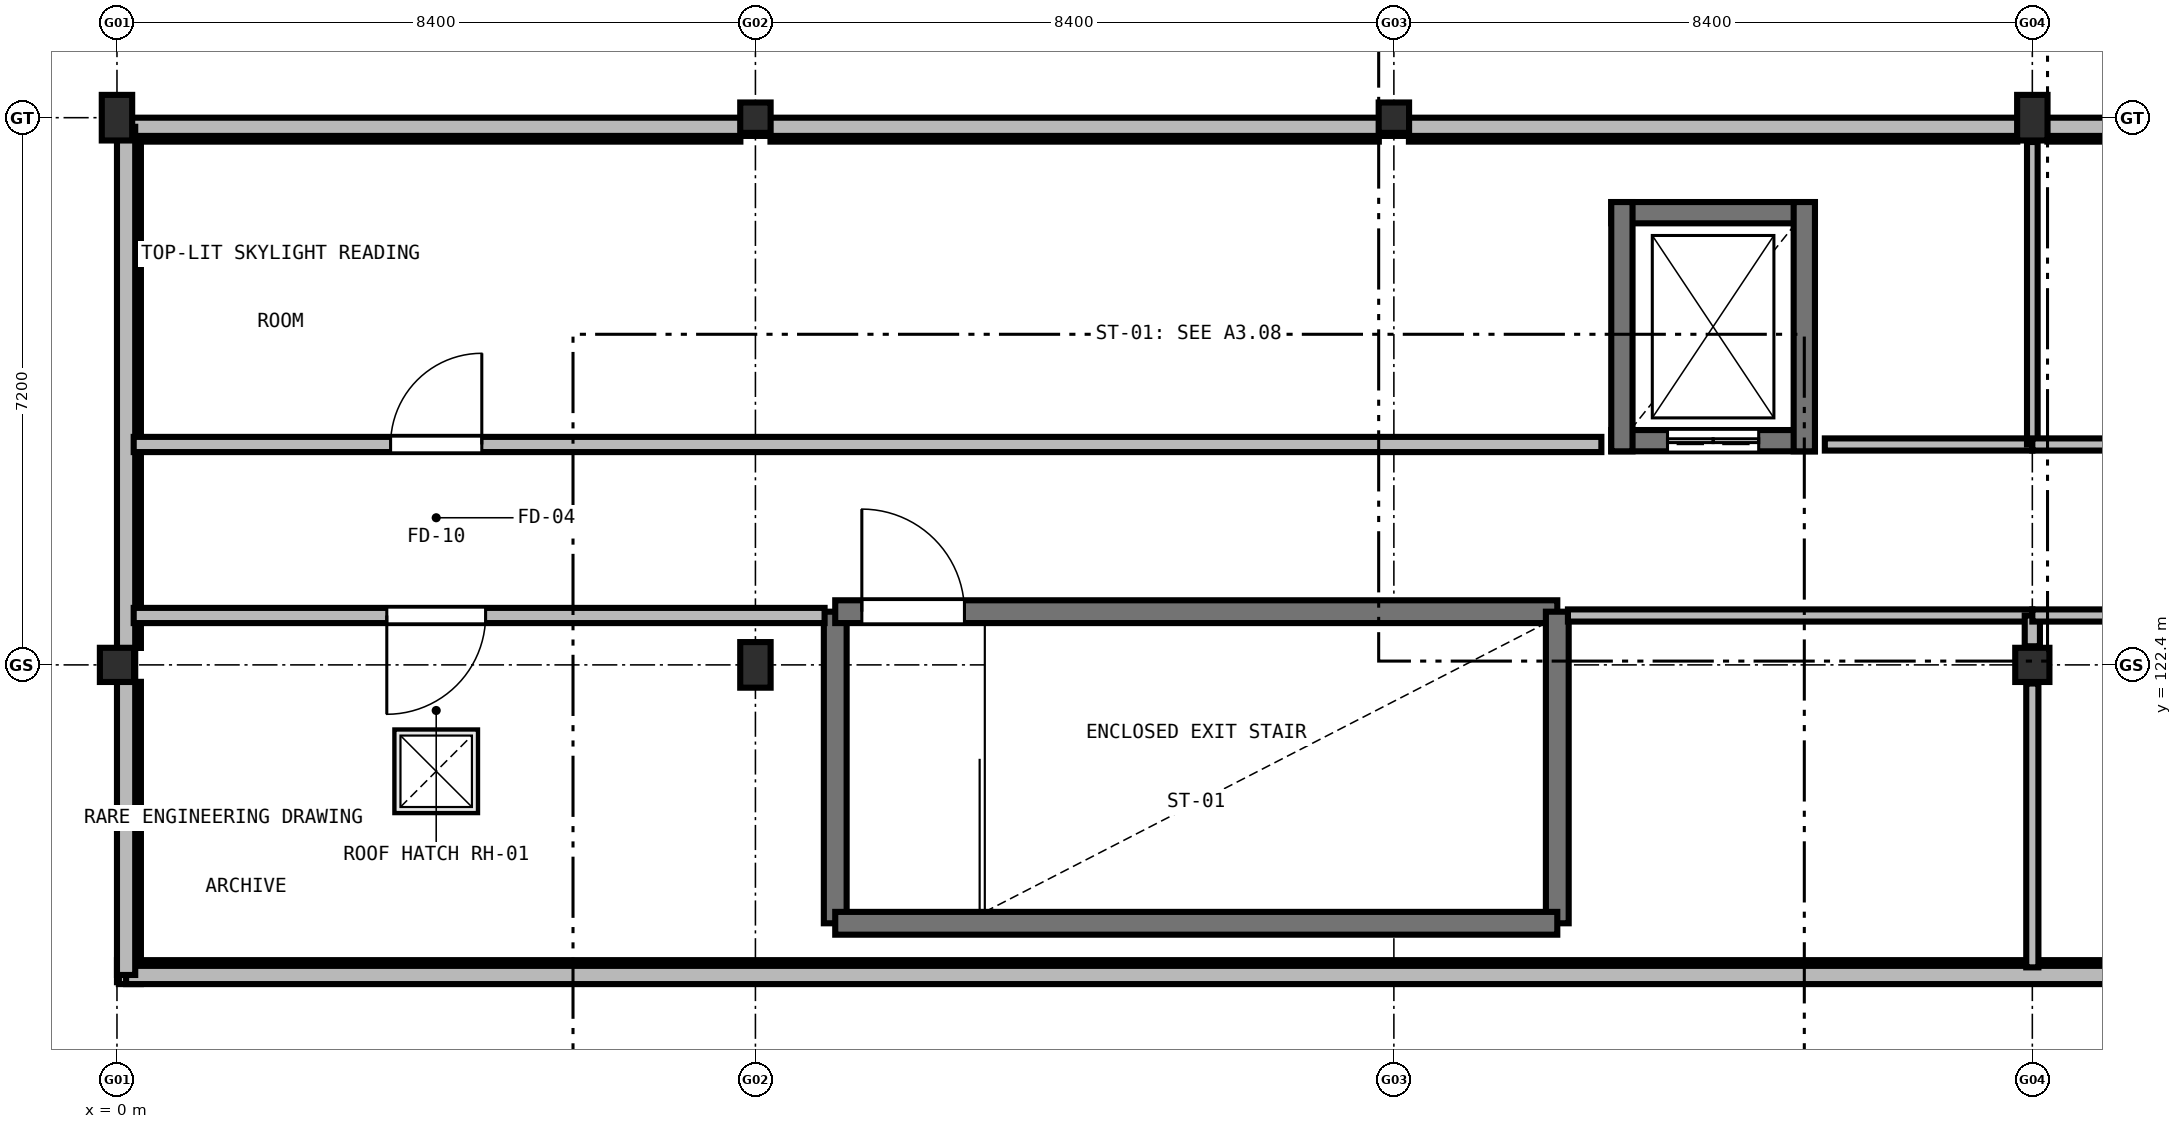
"""IFC4 building model, lengths in metres.
Left out: names, types, materials, properties, quantities, classifications, styles, units other than length and angle.
Written with IfcOpenShell. Run it as: python <this file> out.ifc"""

import sys

from ifc_helpers import new_model, si_unit, direction, frame, frame_2d, origin, origin_2d, place, context, subcontext, project, spatial, rectangle, extrude, element, fill, save


model = new_model("IFC4")
c1 = context("Model", 3, precision=1e-05, world=origin(), true_north=direction((0.0, 1.0)))
c2 = subcontext(c1, "Body", "Model", "MODEL_VIEW")
j1 = project(units=[si_unit("LENGTHUNIT", "METRE"), si_unit("PLANEANGLEUNIT", "RADIAN")], contexts=[c1])
p1 = place(None, origin())
s1 = spatial("IfcSite", under=j1, at=p1, CompositionType="ELEMENT")
p2 = place(p1, origin())
s2 = spatial("IfcBuilding", under=s1, at=p2, CompositionType="ELEMENT")
p3 = place(p2, frame((0.0, 0.0, 26.1)))
s3 = spatial("IfcBuildingStorey", under=s2, at=p3, CompositionType="ELEMENT", Elevation=26.1)
p4 = place(p3, frame((0.0, 122.4, 0.0), z_axis=(0.0, 0.0, 1.0), x_axis=(1.0, 0.0, 0.0)))
e1 = element("IfcColumn", 1, at=p4, inside=s3, PredefinedType="COLUMN", context=c2, shape_type="SweptSolid", body=[
    extrude(rectangle(XDim=0.45, YDim=0.45, at=origin_2d()), origin(), (0.0, 0.0, 1.0), 4.2),
])
for number, where, z_axis, x_axis in (
    (2, (0.0, 129.6, 0.0), (0.0, 0.0, 1.0), (1.0, 0.0, 0.0)),
    (3, (8.4, 122.4, 0.0), (0.0, 0.0, 1.0), (1.0, 0.0, 0.0)),
):
    element("IfcColumn", number, at=place(p3, frame(where, z_axis=z_axis, x_axis=x_axis)), inside=s3, PredefinedType="COLUMN", context=c2, shape_type="SweptSolid", body=[
        extrude(rectangle(XDim=0.4, YDim=0.6, at=origin_2d()), origin(), (0.0, 0.0, 1.0), 4.2),
    ])
for number, where, z_axis, x_axis in (
    (4, (8.4, 129.6, 0.0), (0.0, 0.0, 1.0), (1.0, 0.0, 0.0)),
    (5, (16.8, 129.6, 0.0), (0.0, 0.0, 1.0), (1.0, 0.0, 0.0)),
):
    element("IfcColumn", number, at=place(p3, frame(where, z_axis=z_axis, x_axis=x_axis)), inside=s3, PredefinedType="COLUMN", context=c2, shape_type="SweptSolid", body=[
        extrude(rectangle(XDim=0.4, YDim=0.4, at=origin_2d()), origin(), (0.0, 0.0, 1.0), 4.2),
    ])
p5 = place(p3, frame((25.2, 122.4, 0.0), z_axis=(0.0, 0.0, 1.0), x_axis=(1.0, 0.0, 0.0)))
e6 = element("IfcColumn", 6, at=p5, inside=s3, PredefinedType="COLUMN", context=c2, shape_type="SweptSolid", body=[
    extrude(rectangle(XDim=0.45, YDim=0.45, at=origin_2d()), origin(), (0.0, 0.0, 1.0), 4.2),
])
p6 = place(p3, frame((25.2, 129.6, 0.0), z_axis=(0.0, 0.0, 1.0), x_axis=(1.0, 0.0, 0.0)))
e7 = element("IfcColumn", 7, at=p6, inside=s3, PredefinedType="COLUMN", context=c2, shape_type="SweptSolid", body=[
    extrude(rectangle(XDim=0.4, YDim=0.6, at=origin_2d()), origin(), (0.0, 0.0, 1.0), 4.2),
])
p7 = place(p3, frame((75.6, 118.37, 0.0), z_axis=(0.0, 0.0, 1.0), x_axis=(-1.0, 0.0, 0.0)))
e8 = element("IfcWall", 8, at=p7, inside=s3, PredefinedType="SOLIDWALL", context=c2, shape_type="SweptSolid", body=[
    extrude(rectangle(XDim=75.6, YDim=0.29, at=frame_2d((37.8, 0.0))), origin(), (0.0, 0.0, 1.0), 3.86),
])
p8 = place(p3, frame((0.17, 118.2, 0.0), z_axis=(0.0, 0.0, 1.0), x_axis=(0.0, 1.0, 0.0)))
e9 = element("IfcWall", 9, at=p8, inside=s3, PredefinedType="SOLIDWALL", context=c2, shape_type="SweptSolid", body=[
    extrude(rectangle(XDim=3.977, YDim=0.29, at=frame_2d((1.989, 0.0))), origin(), (0.0, 0.0, 1.0), 3.86),
])
p9 = place(p3, frame((0.17, 122.623, 0.0), z_axis=(0.0, 0.0, 1.0), x_axis=(0.0, 1.0, 0.0)))
e10 = element("IfcWall", 10, at=p9, inside=s3, PredefinedType="SOLIDWALL", context=c2, shape_type="SweptSolid", body=[
    extrude(rectangle(XDim=6.679, YDim=0.29, at=frame_2d((3.339, 0.0))), origin(), (0.0, 0.0, 1.0), 3.5),
])
p10 = place(p3, frame((0.198, 129.43, 0.0), z_axis=(0.0, 0.0, 1.0), x_axis=(1.0, 0.0, 0.0)))
e11 = element("IfcWall", 11, at=p10, inside=s3, PredefinedType="SOLIDWALL", context=c2, shape_type="SweptSolid", body=[
    extrude(rectangle(XDim=8.004, YDim=0.29, at=frame_2d((4.002, 0.0))), origin(), (0.0, 0.0, 1.0), 3.57),
])
p11 = place(p3, frame((8.598, 129.43, 0.0), z_axis=(0.0, 0.0, 1.0), x_axis=(1.0, 0.0, 0.0)))
e12 = element("IfcWall", 12, at=p11, inside=s3, PredefinedType="SOLIDWALL", context=c2, shape_type="SweptSolid", body=[
    extrude(rectangle(XDim=8.004, YDim=0.29, at=frame_2d((4.002, 0.0))), origin(), (0.0, 0.0, 1.0), 3.59),
])
p12 = place(p3, frame((16.998, 129.43, 0.0), z_axis=(0.0, 0.0, 1.0), x_axis=(1.0, 0.0, 0.0)))
e13 = element("IfcWall", 13, at=p12, inside=s3, PredefinedType="SOLIDWALL", context=c2, shape_type="SweptSolid", body=[
    extrude(rectangle(XDim=8.004, YDim=0.29, at=frame_2d((4.002, 0.0))), origin(), (0.0, 0.0, 1.0), 3.59),
])
p13 = place(p3, frame((25.398, 129.43, 0.0), z_axis=(0.0, 0.0, 1.0), x_axis=(1.0, 0.0, 0.0)))
e14 = element("IfcWall", 14, at=p13, inside=s3, PredefinedType="SOLIDWALL", context=c2, shape_type="SweptSolid", body=[
    extrude(rectangle(XDim=7.979, YDim=0.29, at=frame_2d((3.99, 0.0))), origin(), (0.0, 0.0, 1.0), 3.57),
])
for number, where, z_axis, x_axis in (
    (15, (0.12, 129.48, 4.2), (0.0, 0.0, 1.0), (1.0, 0.0, 0.0)),
    (16, (75.48, 118.32, 4.2), (0.0, 0.0, 1.0), (-1.0, 0.0, 0.0)),
):
    element("IfcWall", number, at=place(p3, frame(where, z_axis=z_axis, x_axis=x_axis)), inside=s3, PredefinedType="PARAPET", context=c2, shape_type="SweptSolid", body=[
        extrude(rectangle(XDim=75.36, YDim=0.24, at=frame_2d((37.68, 0.0))), origin(), (0.0, 0.0, 1.0), 0.95),
    ])
p14 = place(p3, frame((0.12, 118.32, 4.2), z_axis=(0.0, 0.0, 1.0), x_axis=(0.0, 1.0, 0.0)))
e17 = element("IfcWall", 17, at=p14, inside=s3, PredefinedType="PARAPET", context=c2, shape_type="SweptSolid", body=[
    extrude(rectangle(XDim=11.16, YDim=0.24, at=frame_2d((5.58, 0.0))), origin(), (0.0, 0.0, 1.0), 0.95),
])
p15 = place(p3, frame((9.45, 119.0, 0.0), z_axis=(0.0, 0.0, 1.0), x_axis=(0.0, 1.0, 0.0)))
e18 = element("IfcWall", 18, at=p15, inside=s3, PredefinedType="SHEAR", context=c2, shape_type="SweptSolid", body=[
    extrude(rectangle(XDim=4.1, YDim=0.3, at=frame_2d((2.05, 0.0))), origin(), (0.0, 0.0, 1.0), 3.96),
])
p16 = place(p3, frame((9.45, 123.1, 0.0), z_axis=(0.0, 0.0, 1.0), x_axis=(1.0, 0.0, 0.0)))
e19 = element("IfcWall", 19, at=p16, inside=s3, PredefinedType="SHEAR", context=c2, shape_type="SweptSolid", body=[
    extrude(rectangle(XDim=9.5, YDim=0.3, at=frame_2d((4.75, 0.0))), origin(), (0.0, 0.0, 1.0), 3.96),
])
p17 = place(p16, frame((0.35, 0.0, 0.0)))
e20 = element("IfcOpeningElement", 20, at=p17, cuts=e19, PredefinedType="OPENING", context=c2, shape_type="SweptSolid", body=[
    extrude(rectangle(XDim=1.35, YDim=2.2, at=frame_2d((0.675, 1.1))), frame((0.0, 0.16, 0.0), z_axis=(0.0, -1.0, 0.0), x_axis=(1.0, 0.0, 0.0)), (0.0, 0.0, 1.0), 0.32),
])
p18 = place(p3, frame((18.95, 123.1, 0.0), z_axis=(0.0, 0.0, 1.0), x_axis=(0.0, -1.0, 0.0)))
e21 = element("IfcWall", 21, at=p18, inside=s3, PredefinedType="SHEAR", context=c2, shape_type="SweptSolid", body=[
    extrude(rectangle(XDim=4.1, YDim=0.3, at=frame_2d((2.05, 0.0))), origin(), (0.0, 0.0, 1.0), 3.96),
])
p19 = place(p3, frame((18.95, 119.0, 0.0), z_axis=(0.0, 0.0, 1.0), x_axis=(-1.0, 0.0, 0.0)))
e22 = element("IfcWall", 22, at=p19, inside=s3, PredefinedType="SHEAR", context=c2, shape_type="SweptSolid", body=[
    extrude(rectangle(XDim=9.5, YDim=0.3, at=frame_2d((4.75, 0.0))), origin(), (0.0, 0.0, 1.0), 3.96),
])
p20 = place(p3, frame((22.34, 125.35, 0.0), z_axis=(0.0, 0.0, 1.0), x_axis=(-1.0, 0.0, 0.0)))
e23 = element("IfcWall", 23, at=p20, inside=s3, PredefinedType="SHEAR", context=c2, shape_type="SweptSolid", body=[
    extrude(rectangle(XDim=2.68, YDim=0.28, at=frame_2d((1.34, 0.0))), origin(), (0.0, 0.0, 1.0), 3.96),
])
p21 = place(p20, frame((0.74, 0.0, 0.0)))
e24 = element("IfcOpeningElement", 24, at=p21, cuts=e23, PredefinedType="OPENING", context=c2, shape_type="SweptSolid", body=[
    extrude(rectangle(XDim=1.2, YDim=2.15, at=frame_2d((0.6, 1.075))), frame((0.0, 0.15, 0.0), z_axis=(0.0, -1.0, 0.0), x_axis=(1.0, 0.0, 0.0)), (0.0, 0.0, 1.0), 0.3),
])
p22 = place(p3, frame((19.66, 128.35, 0.0), z_axis=(0.0, 0.0, 1.0), x_axis=(1.0, 0.0, 0.0)))
e25 = element("IfcWall", 25, at=p22, inside=s3, PredefinedType="SHEAR", context=c2, shape_type="SweptSolid", body=[
    extrude(rectangle(XDim=2.68, YDim=0.28, at=frame_2d((1.34, 0.0))), origin(), (0.0, 0.0, 1.0), 3.96),
])
for number, where, z_axis, x_axis in (
    (26, (19.8, 125.21, 0.0), (0.0, 0.0, 1.0), (0.0, 1.0, 0.0)),
    (27, (22.2, 128.49, 0.0), (0.0, 0.0, 1.0), (0.0, -1.0, 0.0)),
):
    element("IfcWall", number, at=place(p3, frame(where, z_axis=z_axis, x_axis=x_axis)), inside=s3, PredefinedType="SHEAR", context=c2, shape_type="SweptSolid", body=[
        extrude(rectangle(XDim=3.28, YDim=0.28, at=frame_2d((1.64, 0.0))), origin(), (0.0, 0.0, 1.0), 3.96),
    ])
p23 = place(p3, frame((0.22, 125.3, 0.0), z_axis=(0.0, 0.0, 1.0), x_axis=(1.0, 0.0, 0.0)))
e28 = element("IfcWall", 28, at=p23, inside=s3, PredefinedType="SOLIDWALL", context=c2, shape_type="SweptSolid", body=[
    extrude(rectangle(XDim=19.31, YDim=0.2, at=frame_2d((9.655, 0.0))), origin(), (0.0, 0.0, 1.0), 3.495),
])
p24 = place(p23, frame((3.38, 0.0, 0.0)))
e29 = element("IfcOpeningElement", 29, at=p24, cuts=e28, PredefinedType="OPENING", context=c2, shape_type="SweptSolid", body=[
    extrude(rectangle(XDim=1.2, YDim=2.15, at=frame_2d((0.6, 1.075))), frame((0.0, 0.11, 0.0), z_axis=(0.0, -1.0, 0.0), x_axis=(1.0, 0.0, 0.0)), (0.0, 0.0, 1.0), 0.22),
])
p25 = place(p3, frame((22.47, 125.3, 0.0), z_axis=(0.0, 0.0, 1.0), x_axis=(1.0, 0.0, 0.0)))
e30 = element("IfcWall", 30, at=p25, inside=s3, PredefinedType="PARTITIONING", context=c2, shape_type="SweptSolid", body=[
    extrude(rectangle(XDim=2.73, YDim=0.16, at=frame_2d((1.365, 0.0))), origin(), (0.0, 0.0, 1.0), 3.495),
])
p26 = place(p3, frame((25.2, 125.3, 0.0), z_axis=(0.0, 0.0, 1.0), x_axis=(0.0, 1.0, 0.0)))
e31 = element("IfcWall", 31, at=p26, inside=s3, PredefinedType="PARTITIONING", context=c2, shape_type="SweptSolid", body=[
    extrude(rectangle(XDim=3.98, YDim=0.14, at=frame_2d((1.99, 0.0))), origin(), (0.0, 0.0, 1.0), 3.495),
])
p27 = place(p3, frame((25.2, 125.3, 0.0), z_axis=(0.0, 0.0, 1.0), x_axis=(1.0, 0.0, 0.0)))
e32 = element("IfcWall", 32, at=p27, inside=s3, PredefinedType="PARTITIONING", context=c2, shape_type="SweptSolid", body=[
    extrude(rectangle(XDim=25.2, YDim=0.16, at=frame_2d((12.6, 0.0))), origin(), (0.0, 0.0, 1.0), 3.495),
])
p28 = place(p27, frame((3.625, 0.0, 0.0)))
e33 = element("IfcOpeningElement", 33, at=p28, cuts=e32, PredefinedType="OPENING", context=c2, shape_type="SweptSolid", body=[
    extrude(rectangle(XDim=1.15, YDim=2.15, at=frame_2d((0.575, 1.075))), frame((0.0, 0.09, 0.0), z_axis=(0.0, -1.0, 0.0), x_axis=(1.0, 0.0, 0.0)), (0.0, 0.0, 1.0), 0.18),
])
p29 = place(p3, frame((25.2, 123.05, 0.0), z_axis=(0.0, 0.0, 1.0), x_axis=(-1.0, 0.0, 0.0)))
e34 = element("IfcWall", 34, at=p29, inside=s3, PredefinedType="PARTITIONING", context=c2, shape_type="SweptSolid", body=[
    extrude(rectangle(XDim=6.11, YDim=0.16, at=frame_2d((3.055, 0.0))), origin(), (0.0, 0.0, 1.0), 3.495),
])
p30 = place(p3, frame((9.31, 123.05, 0.0), z_axis=(0.0, 0.0, 1.0), x_axis=(-1.0, 0.0, 0.0)))
e35 = element("IfcWall", 35, at=p30, inside=s3, PredefinedType="SOLIDWALL", context=c2, shape_type="SweptSolid", body=[
    extrude(rectangle(XDim=9.09, YDim=0.2, at=frame_2d((4.545, 0.0))), origin(), (0.0, 0.0, 1.0), 3.495),
])
p31 = place(p30, frame((4.46, 0.0, 0.0)))
e36 = element("IfcOpeningElement", 36, at=p31, cuts=e35, PredefinedType="OPENING", context=c2, shape_type="SweptSolid", body=[
    extrude(rectangle(XDim=1.3, YDim=2.15, at=frame_2d((0.65, 1.075))), frame((0.0, 0.11, 0.0), z_axis=(0.0, -1.0, 0.0), x_axis=(1.0, 0.0, 0.0)), (0.0, 0.0, 1.0), 0.22),
])
p32 = place(p3, frame((25.2, 118.42, 0.0), z_axis=(0.0, 0.0, 1.0), x_axis=(0.0, 1.0, 0.0)))
e37 = element("IfcWall", 37, at=p32, inside=s3, PredefinedType="PARTITIONING", context=c2, shape_type="SweptSolid", body=[
    extrude(rectangle(XDim=3.735, YDim=0.16, at=frame_2d((1.868, 0.0))), origin(), (0.0, 0.0, 1.0), 3.345),
])
p33 = place(p3, frame((25.2, 122.645, 0.0), z_axis=(0.0, 0.0, 1.0), x_axis=(0.0, 1.0, 0.0)))
e38 = element("IfcWall", 38, at=p33, inside=s3, PredefinedType="SOLIDWALL", context=c2, shape_type="SweptSolid", body=[
    extrude(rectangle(XDim=0.405, YDim=0.2, at=frame_2d((0.203, 0.0))), origin(), (0.0, 0.0, 1.0), 3.345),
])
p34 = place(p3, frame((33.6, 123.05, 0.0), z_axis=(0.0, 0.0, 1.0), x_axis=(-1.0, 0.0, 0.0)))
e39 = element("IfcWall", 39, at=p34, inside=s3, PredefinedType="PARTITIONING", context=c2, shape_type="SweptSolid", body=[
    extrude(rectangle(XDim=8.4, YDim=0.16, at=frame_2d((4.2, 0.0))), origin(), (0.0, 0.0, 1.0), 3.495),
])
p35 = place(p34, frame((3.675, 0.0, 0.0)))
e40 = element("IfcOpeningElement", 40, at=p35, cuts=e39, PredefinedType="OPENING", context=c2, shape_type="SweptSolid", body=[
    extrude(rectangle(XDim=1.05, YDim=2.15, at=frame_2d((0.525, 1.075))), frame((0.0, 0.09, 0.0), z_axis=(0.0, -1.0, 0.0), x_axis=(1.0, 0.0, 0.0)), (0.0, 0.0, 1.0), 0.18),
])
p36 = place(p2, frame((0.0, 0.0, 30.3)))
p37 = place(p36, frame((0.0, 0.0, -0.24)))
p38 = place(p37, frame((4.2, 121.0, 0.0)))
p39 = place(p38, frame((0.0, 0.0, 0.19)))
e41 = element("IfcDoor", 41, at=p39, inside=s3, OperationType="SINGLE_SWING_LEFT", PredefinedType="TRAPDOOR", context=c2, shape_type="SweptSolid", body=[
    extrude(rectangle(XDim=1.1, YDim=1.1, at=origin_2d()), origin(), (0.0, 0.0, 1.0), 0.05),
])
p40 = place(p17, origin())
e42 = element("IfcDoor", 42, at=p40, inside=s3, OperationType="SINGLE_SWING_LEFT", PredefinedType="DOOR", context=c2, shape_type="SweptSolid", body=[
    extrude(rectangle(XDim=1.35, YDim=2.2, at=frame_2d((0.675, 1.1))), frame((0.0, 0.025, 0.0), z_axis=(0.0, -1.0, 0.0), x_axis=(1.0, 0.0, 0.0)), (0.0, 0.0, 1.0), 0.05),
])
fill(e20, e42)
p41 = place(p21, origin())
e43 = element("IfcDoor", 43, at=p41, inside=s3, OperationType="DOUBLE_DOOR_SLIDING", PredefinedType="DOOR", context=c2, shape_type="SweptSolid", body=[
    extrude(rectangle(XDim=1.2, YDim=2.15, at=frame_2d((0.6, 1.075))), frame((0.0, 0.025, 0.0), z_axis=(0.0, -1.0, 0.0), x_axis=(1.0, 0.0, 0.0)), (0.0, 0.0, 1.0), 0.05),
])
fill(e24, e43)
p42 = place(p24, origin())
e44 = element("IfcDoor", 44, at=p42, inside=s3, OperationType="SINGLE_SWING_RIGHT", PredefinedType="DOOR", context=c2, shape_type="SweptSolid", body=[
    extrude(rectangle(XDim=1.2, YDim=2.15, at=frame_2d((0.6, 1.075))), frame((0.0, 0.025, 0.0), z_axis=(0.0, -1.0, 0.0), x_axis=(1.0, 0.0, 0.0)), (0.0, 0.0, 1.0), 0.05),
])
fill(e29, e44)
p43 = place(p31, origin())
e45 = element("IfcDoor", 45, at=p43, inside=s3, OperationType="SINGLE_SWING_RIGHT", PredefinedType="DOOR", context=c2, shape_type="SweptSolid", body=[
    extrude(rectangle(XDim=1.3, YDim=2.15, at=frame_2d((0.65, 1.075))), frame((0.0, 0.025, 0.0), z_axis=(0.0, -1.0, 0.0), x_axis=(1.0, 0.0, 0.0)), (0.0, 0.0, 1.0), 0.05),
])
fill(e36, e45)
save(model, sys.argv[1])
